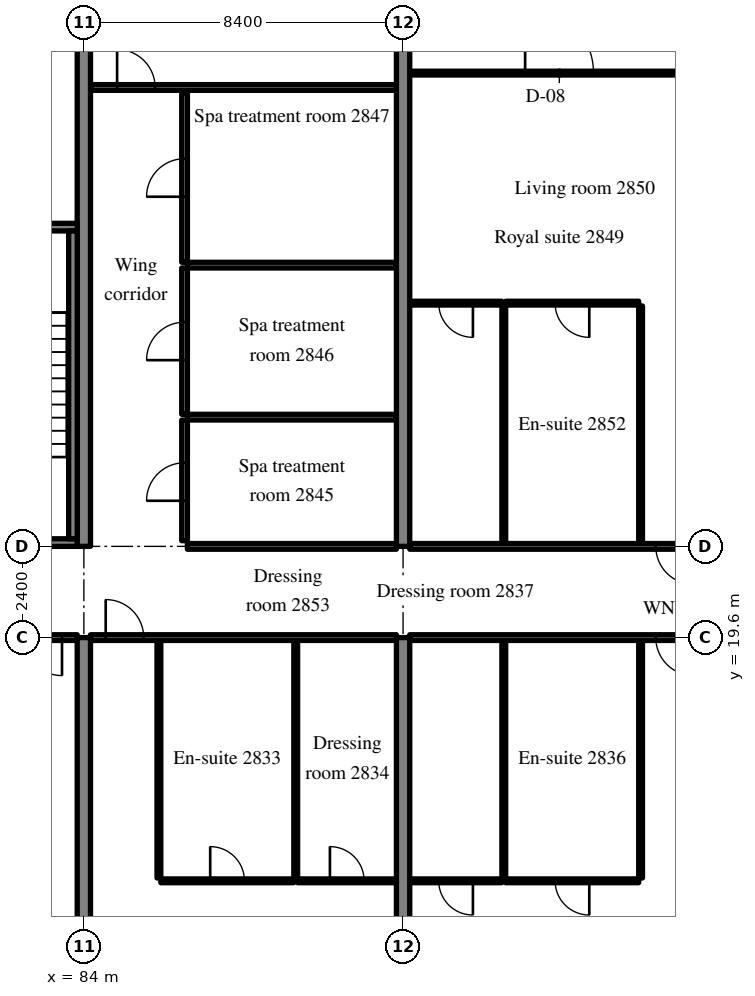
"""IFC4 building model, lengths in metres.
Left out: names, types, materials, properties, quantities, classifications, styles, units other than length and angle.
Written with IfcOpenShell. Run it as: python <this file> out.ifc"""

import sys

from ifc_helpers import new_model, si_unit, direction, frame, frame_2d, origin, place, context, subcontext, project, spatial, rectangle, extrude, source, transform, mapped, element, fill, save


model = new_model("IFC4")
c1 = context("Model", 3, precision=1e-05, world=origin(), true_north=direction((0.0, 1.0)))
c2 = subcontext(c1, "Body", "Model", "MODEL_VIEW")
j1 = project(units=[si_unit("LENGTHUNIT", "METRE"), si_unit("PLANEANGLEUNIT", "RADIAN")], contexts=[c1])
p1 = place(None, origin())
s1 = spatial("IfcSite", under=j1, at=p1, CompositionType="ELEMENT")
p2 = place(p1, origin())
s2 = spatial("IfcBuilding", under=s1, at=p2, CompositionType="ELEMENT")
p3 = place(p2, frame((0.0, 0.0, 118.0)))
s3 = spatial("IfcBuildingStorey", under=s2, at=p3, CompositionType="ELEMENT", Elevation=118.0)
m1 = source(origin(), c2, "Body", "SweptSolid", [
    extrude(rectangle(XDim=14.1, YDim=0.35, at=frame_2d((7.05, 0.0))), origin(), (0.0, 0.0, 1.0), 3.52),
])
p4 = place(p3, frame((84.0, 5.5, 0.0), z_axis=(0.0, 0.0, 1.0), x_axis=(0.0, 1.0, 0.0)))
e1 = element("IfcWall", 1, at=p4, inside=s3, PredefinedType="SHEAR", context=c2, shape_type="MappedRepresentation", body=[
    mapped(m1, transform((0.0, 0.0, 0.0), scale=1.0)),
])
m2 = source(origin(), c2, "Body", "SweptSolid", [
    extrude(rectangle(XDim=20.0, YDim=0.35, at=frame_2d((10.0, 0.0))), origin(), (0.0, 0.0, 1.0), 3.52),
])
p5 = place(p3, frame((84.0, 22.0, 0.0), z_axis=(0.0, 0.0, 1.0), x_axis=(0.0, 1.0, 0.0)))
e2 = element("IfcWall", 2, at=p5, inside=s3, PredefinedType="SHEAR", context=c2, shape_type="MappedRepresentation", body=[
    mapped(m2, transform((0.0, 0.0, 0.0), scale=1.0)),
])
p6 = place(p3, frame((92.4, 5.5, 0.0), z_axis=(0.0, 0.0, 1.0), x_axis=(0.0, 1.0, 0.0)))
e3 = element("IfcWall", 3, at=p6, inside=s3, PredefinedType="SHEAR", context=c2, shape_type="MappedRepresentation", body=[
    mapped(m1, transform((0.0, 0.0, 0.0), scale=1.0)),
])
p7 = place(p3, frame((92.4, 22.0, 0.0), z_axis=(0.0, 0.0, 1.0), x_axis=(0.0, 1.0, 0.0)))
e4 = element("IfcWall", 4, at=p7, inside=s3, PredefinedType="SHEAR", context=c2, shape_type="MappedRepresentation", body=[
    mapped(m2, transform((0.0, 0.0, 0.0), scale=1.0)),
])
m3 = source(origin(), c2, "Body", "SweptSolid", [
    extrude(rectangle(XDim=8.225, YDim=0.2, at=frame_2d((4.112, 0.0))), origin(), (0.0, 0.0, 1.0), 3.52),
])
p8 = place(p3, frame((83.825, 22.1, 0.0), z_axis=(0.0, 0.0, 1.0), x_axis=(-1.0, 0.0, 0.0)))
e5 = element("IfcWall", 5, at=p8, inside=s3, PredefinedType="SOLIDWALL", context=c2, shape_type="MappedRepresentation", body=[
    mapped(m3, transform((0.0, 0.0, 0.0), scale=1.0)),
])
m4 = source(origin(), c2, "Body", "SweptSolid", [
    extrude(rectangle(XDim=1.2, YDim=2.1, at=frame_2d((0.6, 1.05))), frame((0.0, 0.11, 0.0), z_axis=(0.0, -1.0, 0.0), x_axis=(1.0, 0.0, 0.0)), (0.0, 0.0, 1.0), 0.22),
])
p9 = place(p8, frame((6.025, 0.0, 0.0)))
e6 = element("IfcOpeningElement", 6, at=p9, cuts=e5, PredefinedType="OPENING", context=c2, shape_type="MappedRepresentation", body=[
    mapped(m4, transform((0.0, 0.0, 0.0), scale=1.0)),
])
p10 = place(p3, frame((83.825, 30.4, 0.0), z_axis=(0.0, 0.0, 1.0), x_axis=(-1.0, 0.0, 0.0)))
e7 = element("IfcWall", 7, at=p10, inside=s3, PredefinedType="SOLIDWALL", context=c2, shape_type="MappedRepresentation", body=[
    mapped(m3, transform((0.0, 0.0, 0.0), scale=1.0)),
])
m5 = source(origin(), c2, "Body", "SweptSolid", [
    extrude(rectangle(XDim=1.0, YDim=2.1, at=frame_2d((0.5, 1.05))), frame((0.0, 0.11, 0.0), z_axis=(0.0, -1.0, 0.0), x_axis=(1.0, 0.0, 0.0)), (0.0, 0.0, 1.0), 0.22),
])
p11 = place(p10, frame((6.125, 0.0, 0.0)))
e8 = element("IfcOpeningElement", 8, at=p11, cuts=e7, PredefinedType="OPENING", context=c2, shape_type="MappedRepresentation", body=[
    mapped(m5, transform((0.0, 0.0, 0.0), scale=1.0)),
])
m6 = source(origin(), c2, "Body", "SweptSolid", [
    extrude(rectangle(XDim=8.1, YDim=0.225, at=frame_2d((4.05, 0.0))), origin(), (0.0, 0.0, 1.0), 3.52),
])
p12 = place(p3, frame((83.713, 22.2, 0.0), z_axis=(0.0, 0.0, 1.0), x_axis=(0.0, 1.0, 0.0)))
e9 = element("IfcWall", 9, at=p12, inside=s3, PredefinedType="SOLIDWALL", context=c2, shape_type="MappedRepresentation", body=[
    mapped(m6, transform((0.0, 0.0, 0.0), scale=1.0)),
])
m7 = source(origin(), c2, "Body", "SweptSolid", [
    extrude(rectangle(XDim=8.05, YDim=0.15, at=frame_2d((4.025, 0.0))), origin(), (0.0, 0.0, 1.0), 2.82),
])
p13 = place(p3, frame((75.775, 19.6, 0.0), z_axis=(0.0, 0.0, 1.0), x_axis=(1.0, 0.0, 0.0)))
e10 = element("IfcWall", 10, at=p13, inside=s3, PredefinedType="PARTITIONING", context=c2, shape_type="MappedRepresentation", body=[
    mapped(m7, transform((0.0, 0.0, 0.0), scale=1.0)),
])
m8 = source(origin(), c2, "Body", "SweptSolid", [
    extrude(rectangle(XDim=1.0, YDim=2.1, at=frame_2d((0.5, 1.05))), frame((0.0, 0.085, 0.0), z_axis=(0.0, -1.0, 0.0), x_axis=(1.0, 0.0, 0.0)), (0.0, 0.0, 1.0), 0.17),
])
p14 = place(p13, frame((6.65, 0.0, 0.0)))
e11 = element("IfcOpeningElement", 11, at=p14, cuts=e10, PredefinedType="OPENING", context=c2, shape_type="MappedRepresentation", body=[
    mapped(m8, transform((0.0, 0.0, 0.0), scale=1.0)),
])
m9 = source(origin(), c2, "Body", "SweptSolid", [
    extrude(rectangle(XDim=6.25, YDim=0.1, at=frame_2d((3.125, 0.0))), origin(), (0.0, 0.0, 1.0), 3.52),
])
for number, where, z_axis, x_axis in (
    (12, (85.975, 13.275, 0.0), (0.0, 0.0, 1.0), (0.0, 1.0, 0.0)),
    (13, (89.575, 13.275, 0.0), (0.0, 0.0, 1.0), (0.0, 1.0, 0.0)),
):
    element("IfcWall", number, at=place(p3, frame(where, z_axis=z_axis, x_axis=x_axis)), inside=s3, PredefinedType="PARTITIONING", context=c2, shape_type="MappedRepresentation", body=[
        mapped(m9, transform((0.0, 0.0, 0.0), scale=1.0)),
    ])
m10 = source(origin(), c2, "Body", "SweptSolid", [
    extrude(rectangle(XDim=3.5, YDim=0.1, at=frame_2d((1.75, 0.0))), origin(), (0.0, 0.0, 1.0), 3.52),
])
p15 = place(p3, frame((86.025, 13.2, 0.0), z_axis=(0.0, 0.0, 1.0), x_axis=(1.0, 0.0, 0.0)))
e14 = element("IfcWall", 14, at=p15, inside=s3, PredefinedType="PARTITIONING", context=c2, shape_type="MappedRepresentation", body=[
    mapped(m10, transform((0.0, 0.0, 0.0), scale=1.0)),
])
m11 = source(origin(), c2, "Body", "SweptSolid", [
    extrude(rectangle(XDim=0.9, YDim=2.1, at=frame_2d((0.45, 1.05))), frame((0.0, 0.06, 0.0), z_axis=(0.0, -1.0, 0.0), x_axis=(1.0, 0.0, 0.0)), (0.0, 0.0, 1.0), 0.12),
])
p16 = place(p15, frame((1.3, 0.0, 0.0)))
e15 = element("IfcOpeningElement", 15, at=p16, cuts=e14, PredefinedType="OPENING", context=c2, shape_type="MappedRepresentation", body=[
    mapped(m11, transform((0.0, 0.0, 0.0), scale=1.0)),
])
m12 = source(origin(), c2, "Body", "SweptSolid", [
    extrude(rectangle(XDim=2.6, YDim=0.1, at=frame_2d((1.3, 0.0))), origin(), (0.0, 0.0, 1.0), 3.52),
])
p17 = place(p3, frame((89.625, 13.2, 0.0), z_axis=(0.0, 0.0, 1.0), x_axis=(1.0, 0.0, 0.0)))
e16 = element("IfcWall", 16, at=p17, inside=s3, PredefinedType="PARTITIONING", context=c2, shape_type="MappedRepresentation", body=[
    mapped(m12, transform((0.0, 0.0, 0.0), scale=1.0)),
])
p18 = place(p17, frame((0.85, 0.0, 0.0)))
e17 = element("IfcOpeningElement", 17, at=p18, cuts=e16, PredefinedType="OPENING", context=c2, shape_type="MappedRepresentation", body=[
    mapped(m11, transform((0.0, 0.0, 0.0), scale=1.0)),
])
p19 = place(p3, frame((84.175, 19.6, 0.0), z_axis=(0.0, 0.0, 1.0), x_axis=(1.0, 0.0, 0.0)))
e18 = element("IfcWall", 18, at=p19, inside=s3, PredefinedType="PARTITIONING", context=c2, shape_type="MappedRepresentation", body=[
    mapped(m7, transform((0.0, 0.0, 0.0), scale=1.0)),
])
p20 = place(p19, frame((0.4, 0.0, 0.0)))
e19 = element("IfcOpeningElement", 19, at=p20, cuts=e18, PredefinedType="OPENING", context=c2, shape_type="MappedRepresentation", body=[
    mapped(m8, transform((0.0, 0.0, 0.0), scale=1.0)),
])
for number, where, z_axis, x_axis in (
    (20, (98.65, 13.275, 0.0), (0.0, 0.0, 1.0), (0.0, 1.0, 0.0)),
    (21, (95.05, 13.275, 0.0), (0.0, 0.0, 1.0), (0.0, 1.0, 0.0)),
):
    element("IfcWall", number, at=place(p3, frame(where, z_axis=z_axis, x_axis=x_axis)), inside=s3, PredefinedType="PARTITIONING", context=c2, shape_type="MappedRepresentation", body=[
        mapped(m9, transform((0.0, 0.0, 0.0), scale=1.0)),
    ])
p21 = place(p3, frame((95.1, 13.2, 0.0), z_axis=(0.0, 0.0, 1.0), x_axis=(1.0, 0.0, 0.0)))
e22 = element("IfcWall", 22, at=p21, inside=s3, PredefinedType="PARTITIONING", context=c2, shape_type="MappedRepresentation", body=[
    mapped(m10, transform((0.0, 0.0, 0.0), scale=1.0)),
])
p22 = place(p21, frame((1.3, 0.0, 0.0)))
e23 = element("IfcOpeningElement", 23, at=p22, cuts=e22, PredefinedType="OPENING", context=c2, shape_type="MappedRepresentation", body=[
    mapped(m11, transform((0.0, 0.0, 0.0), scale=1.0)),
])
m13 = source(origin(), c2, "Body", "SweptSolid", [
    extrude(rectangle(XDim=2.425, YDim=0.1, at=frame_2d((1.212, 0.0))), origin(), (0.0, 0.0, 1.0), 3.52),
])
p23 = place(p3, frame((92.575, 13.2, 0.0), z_axis=(0.0, 0.0, 1.0), x_axis=(1.0, 0.0, 0.0)))
e24 = element("IfcWall", 24, at=p23, inside=s3, PredefinedType="PARTITIONING", context=c2, shape_type="MappedRepresentation", body=[
    mapped(m13, transform((0.0, 0.0, 0.0), scale=1.0)),
])
p24 = place(p23, frame((0.763, 0.0, 0.0)))
e25 = element("IfcOpeningElement", 25, at=p24, cuts=e24, PredefinedType="OPENING", context=c2, shape_type="MappedRepresentation", body=[
    mapped(m11, transform((0.0, 0.0, 0.0), scale=1.0)),
])
m14 = source(origin(), c2, "Body", "SweptSolid", [
    extrude(rectangle(XDim=7.875, YDim=0.15, at=frame_2d((3.938, 0.0))), origin(), (0.0, 0.0, 1.0), 2.82),
])
p25 = place(p3, frame((92.575, 19.6, 0.0), z_axis=(0.0, 0.0, 1.0), x_axis=(1.0, 0.0, 0.0)))
e26 = element("IfcWall", 26, at=p25, inside=s3, PredefinedType="PARTITIONING", context=c2, shape_type="MappedRepresentation", body=[
    mapped(m14, transform((0.0, 0.0, 0.0), scale=1.0)),
])
p26 = place(p25, frame((6.475, 0.0, 0.0)))
e27 = element("IfcOpeningElement", 27, at=p26, cuts=e26, PredefinedType="OPENING", context=c2, shape_type="MappedRepresentation", body=[
    mapped(m8, transform((0.0, 0.0, 0.0), scale=1.0)),
])
m15 = source(origin(), c2, "Body", "SweptSolid", [
    extrude(rectangle(XDim=5.5, YDim=0.15, at=frame_2d((2.75, 0.0))), origin(), (0.0, 0.0, 1.0), 2.82),
])
p27 = place(p3, frame((86.725, 22.0, 0.0), z_axis=(0.0, 0.0, 1.0), x_axis=(1.0, 0.0, 0.0)))
e28 = element("IfcWall", 28, at=p27, inside=s3, PredefinedType="PARTITIONING", context=c2, shape_type="MappedRepresentation", body=[
    mapped(m15, transform((0.0, 0.0, 0.0), scale=1.0)),
])
m16 = source(origin(), c2, "Body", "SweptSolid", [
    extrude(rectangle(XDim=3.175, YDim=0.15, at=frame_2d((1.587, 0.0))), origin(), (0.0, 0.0, 1.0), 3.52),
])
p28 = place(p3, frame((86.65, 22.15, 0.0), z_axis=(0.0, 0.0, 1.0), x_axis=(0.0, 1.0, 0.0)))
e29 = element("IfcWall", 29, at=p28, inside=s3, PredefinedType="PARTITIONING", context=c2, shape_type="MappedRepresentation", body=[
    mapped(m16, transform((0.0, 0.0, 0.0), scale=1.0)),
])
p29 = place(p28, frame((1.05, 0.0, 0.0)))
e30 = element("IfcOpeningElement", 30, at=p29, cuts=e29, PredefinedType="OPENING", context=c2, shape_type="MappedRepresentation", body=[
    mapped(m8, transform((0.0, 0.0, 0.0), scale=1.0)),
])
m17 = source(origin(), c2, "Body", "SweptSolid", [
    extrude(rectangle(XDim=5.5, YDim=0.15, at=frame_2d((2.75, 0.0))), origin(), (0.0, 0.0, 1.0), 3.52),
])
p30 = place(p3, frame((86.725, 25.4, 0.0), z_axis=(0.0, 0.0, 1.0), x_axis=(1.0, 0.0, 0.0)))
e31 = element("IfcWall", 31, at=p30, inside=s3, PredefinedType="PARTITIONING", context=c2, shape_type="MappedRepresentation", body=[
    mapped(m17, transform((0.0, 0.0, 0.0), scale=1.0)),
])
m18 = source(origin(), c2, "Body", "SweptSolid", [
    extrude(rectangle(XDim=3.85, YDim=0.15, at=frame_2d((1.925, 0.0))), origin(), (0.0, 0.0, 1.0), 3.52),
])
p31 = place(p3, frame((86.65, 25.475, 0.0), z_axis=(0.0, 0.0, 1.0), x_axis=(0.0, 1.0, 0.0)))
e32 = element("IfcWall", 32, at=p31, inside=s3, PredefinedType="PARTITIONING", context=c2, shape_type="MappedRepresentation", body=[
    mapped(m18, transform((0.0, 0.0, 0.0), scale=1.0)),
])
p32 = place(p31, frame((1.425, 0.0, 0.0)))
e33 = element("IfcOpeningElement", 33, at=p32, cuts=e32, PredefinedType="OPENING", context=c2, shape_type="MappedRepresentation", body=[
    mapped(m8, transform((0.0, 0.0, 0.0), scale=1.0)),
])
p33 = place(p3, frame((86.725, 29.4, 0.0), z_axis=(0.0, 0.0, 1.0), x_axis=(1.0, 0.0, 0.0)))
e34 = element("IfcWall", 34, at=p33, inside=s3, PredefinedType="PARTITIONING", context=c2, shape_type="MappedRepresentation", body=[
    mapped(m17, transform((0.0, 0.0, 0.0), scale=1.0)),
])
m19 = source(origin(), c2, "Body", "SweptSolid", [
    extrude(rectangle(XDim=4.45, YDim=0.15, at=frame_2d((2.225, 0.0))), origin(), (0.0, 0.0, 1.0), 3.52),
])
p34 = place(p3, frame((86.65, 29.475, 0.0), z_axis=(0.0, 0.0, 1.0), x_axis=(0.0, 1.0, 0.0)))
e35 = element("IfcWall", 35, at=p34, inside=s3, PredefinedType="PARTITIONING", context=c2, shape_type="MappedRepresentation", body=[
    mapped(m19, transform((0.0, 0.0, 0.0), scale=1.0)),
])
p35 = place(p34, frame((1.725, 0.0, 0.0)))
e36 = element("IfcOpeningElement", 36, at=p35, cuts=e35, PredefinedType="OPENING", context=c2, shape_type="MappedRepresentation", body=[
    mapped(m8, transform((0.0, 0.0, 0.0), scale=1.0)),
])
m20 = source(origin(), c2, "Body", "SweptSolid", [
    extrude(rectangle(XDim=8.05, YDim=0.15, at=frame_2d((4.025, 0.0))), origin(), (0.0, 0.0, 1.0), 3.52),
])
p36 = place(p3, frame((84.175, 34.075, 0.0), z_axis=(0.0, 0.0, 1.0), x_axis=(1.0, 0.0, 0.0)))
e37 = element("IfcWall", 37, at=p36, inside=s3, PredefinedType="PARTITIONING", context=c2, shape_type="MappedRepresentation", body=[
    mapped(m20, transform((0.0, 0.0, 0.0), scale=1.0)),
])
p37 = place(p36, frame((0.7, 0.0, 0.0)))
e38 = element("IfcOpeningElement", 38, at=p37, cuts=e37, PredefinedType="OPENING", context=c2, shape_type="MappedRepresentation", body=[
    mapped(m8, transform((0.0, 0.0, 0.0), scale=1.0)),
])
for number, where, z_axis, x_axis in (
    (39, (98.65, 22.075, 0.0), (0.0, 0.0, 1.0), (0.0, 1.0, 0.0)),
    (40, (95.05, 22.075, 0.0), (0.0, 0.0, 1.0), (0.0, 1.0, 0.0)),
):
    element("IfcWall", number, at=place(p3, frame(where, z_axis=z_axis, x_axis=x_axis)), inside=s3, PredefinedType="PARTITIONING", context=c2, shape_type="MappedRepresentation", body=[
        mapped(m9, transform((0.0, 0.0, 0.0), scale=1.0)),
    ])
p38 = place(p3, frame((95.1, 28.4, 0.0), z_axis=(0.0, 0.0, 1.0), x_axis=(1.0, 0.0, 0.0)))
e41 = element("IfcWall", 41, at=p38, inside=s3, PredefinedType="PARTITIONING", context=c2, shape_type="MappedRepresentation", body=[
    mapped(m10, transform((0.0, 0.0, 0.0), scale=1.0)),
])
p39 = place(p38, frame((1.3, 0.0, 0.0)))
e42 = element("IfcOpeningElement", 42, at=p39, cuts=e41, PredefinedType="OPENING", context=c2, shape_type="MappedRepresentation", body=[
    mapped(m11, transform((0.0, 0.0, 0.0), scale=1.0)),
])
p40 = place(p3, frame((92.575, 28.4, 0.0), z_axis=(0.0, 0.0, 1.0), x_axis=(1.0, 0.0, 0.0)))
e43 = element("IfcWall", 43, at=p40, inside=s3, PredefinedType="PARTITIONING", context=c2, shape_type="MappedRepresentation", body=[
    mapped(m13, transform((0.0, 0.0, 0.0), scale=1.0)),
])
p41 = place(p40, frame((0.763, 0.0, 0.0)))
e44 = element("IfcOpeningElement", 44, at=p41, cuts=e43, PredefinedType="OPENING", context=c2, shape_type="MappedRepresentation", body=[
    mapped(m11, transform((0.0, 0.0, 0.0), scale=1.0)),
])
m21 = source(origin(), c2, "Body", "SweptSolid", [
    extrude(rectangle(XDim=7.875, YDim=0.1, at=frame_2d((3.938, 0.0))), origin(), (0.0, 0.0, 1.0), 3.52),
])
p42 = place(p3, frame((92.575, 34.453, 0.0), z_axis=(0.0, 0.0, 1.0), x_axis=(1.0, 0.0, 0.0)))
e45 = element("IfcWall", 45, at=p42, inside=s3, PredefinedType="PARTITIONING", context=c2, shape_type="MappedRepresentation", body=[
    mapped(m21, transform((0.0, 0.0, 0.0), scale=1.0)),
])
m22 = source(origin(), c2, "Body", "SweptSolid", [
    extrude(rectangle(XDim=1.8, YDim=2.1, at=frame_2d((0.9, 1.05))), frame((0.0, 0.06, 0.0), z_axis=(0.0, -1.0, 0.0), x_axis=(1.0, 0.0, 0.0)), (0.0, 0.0, 1.0), 0.12),
])
p43 = place(p42, frame((3.037, 0.0, 0.0)))
e46 = element("IfcOpeningElement", 46, at=p43, cuts=e45, PredefinedType="OPENING", context=c2, shape_type="MappedRepresentation", body=[
    mapped(m22, transform((0.0, 0.0, 0.0), scale=1.0)),
])
p44 = place(p3, frame((92.575, 22.0, 0.0), z_axis=(0.0, 0.0, 1.0), x_axis=(1.0, 0.0, 0.0)))
e47 = element("IfcWall", 47, at=p44, inside=s3, PredefinedType="PARTITIONING", context=c2, shape_type="MappedRepresentation", body=[
    mapped(m14, transform((0.0, 0.0, 0.0), scale=1.0)),
])
p45 = place(p44, frame((6.475, 0.0, 0.0)))
e48 = element("IfcOpeningElement", 48, at=p45, cuts=e47, PredefinedType="OPENING", context=c2, shape_type="MappedRepresentation", body=[
    mapped(m8, transform((0.0, 0.0, 0.0), scale=1.0)),
])
m23 = source(origin(), c2, "Body", "SweptSolid", [
    extrude(rectangle(XDim=1.0, YDim=2.1, at=frame_2d((0.5, 1.05))), frame((0.0, 0.025, 0.0), z_axis=(0.0, -1.0, 0.0), x_axis=(1.0, 0.0, 0.0)), (0.0, 0.0, 1.0), 0.05),
])
p46 = place(p14, origin())
e49 = element("IfcDoor", 49, at=p46, inside=s3, OperationType="SINGLE_SWING_RIGHT", PredefinedType="DOOR", context=c2, shape_type="MappedRepresentation", body=[
    mapped(m23, transform((0.0, 0.0, 0.0), scale=1.0)),
])
fill(e11, e49)
m24 = source(origin(), c2, "Body", "SweptSolid", [
    extrude(rectangle(XDim=0.9, YDim=2.1, at=frame_2d((0.45, 1.05))), frame((0.0, 0.025, 0.0), z_axis=(0.0, -1.0, 0.0), x_axis=(1.0, 0.0, 0.0)), (0.0, 0.0, 1.0), 0.05),
])
p47 = place(p16, origin())
e50 = element("IfcDoor", 50, at=p47, inside=s3, OperationType="SINGLE_SWING_LEFT", PredefinedType="DOOR", context=c2, shape_type="MappedRepresentation", body=[
    mapped(m24, transform((0.0, 0.0, 0.0), scale=1.0)),
])
fill(e15, e50)
p48 = place(p18, origin())
e51 = element("IfcDoor", 51, at=p48, inside=s3, OperationType="SINGLE_SWING_LEFT", PredefinedType="DOOR", context=c2, shape_type="MappedRepresentation", body=[
    mapped(m24, transform((0.0, 0.0, 0.0), scale=1.0)),
])
fill(e17, e51)
p49 = place(p20, origin())
e52 = element("IfcDoor", 52, at=p49, inside=s3, OperationType="SINGLE_SWING_LEFT", PredefinedType="DOOR", context=c2, shape_type="MappedRepresentation", body=[
    mapped(m23, transform((0.0, 0.0, 0.0), scale=1.0)),
])
fill(e19, e52)
p50 = place(p22, origin())
e53 = element("IfcDoor", 53, at=p50, inside=s3, OperationType="SINGLE_SWING_RIGHT", PredefinedType="DOOR", context=c2, shape_type="MappedRepresentation", body=[
    mapped(m24, transform((0.0, 0.0, 0.0), scale=1.0)),
])
fill(e23, e53)
p51 = place(p24, origin())
e54 = element("IfcDoor", 54, at=p51, inside=s3, OperationType="SINGLE_SWING_RIGHT", PredefinedType="DOOR", context=c2, shape_type="MappedRepresentation", body=[
    mapped(m24, transform((0.0, 0.0, 0.0), scale=1.0)),
])
fill(e25, e54)
p52 = place(p26, origin())
e55 = element("IfcDoor", 55, at=p52, inside=s3, OperationType="SINGLE_SWING_RIGHT", PredefinedType="DOOR", context=c2, shape_type="MappedRepresentation", body=[
    mapped(m23, transform((0.0, 0.0, 0.0), scale=1.0)),
])
fill(e27, e55)
p53 = place(p29, origin())
e56 = element("IfcDoor", 56, at=p53, inside=s3, OperationType="SINGLE_SWING_LEFT", PredefinedType="DOOR", context=c2, shape_type="MappedRepresentation", body=[
    mapped(m23, transform((0.0, 0.0, 0.0), scale=1.0)),
])
fill(e30, e56)
p54 = place(p32, origin())
e57 = element("IfcDoor", 57, at=p54, inside=s3, OperationType="SINGLE_SWING_LEFT", PredefinedType="DOOR", context=c2, shape_type="MappedRepresentation", body=[
    mapped(m23, transform((0.0, 0.0, 0.0), scale=1.0)),
])
fill(e33, e57)
p55 = place(p35, origin())
e58 = element("IfcDoor", 58, at=p55, inside=s3, OperationType="SINGLE_SWING_LEFT", PredefinedType="DOOR", context=c2, shape_type="MappedRepresentation", body=[
    mapped(m23, transform((0.0, 0.0, 0.0), scale=1.0)),
])
fill(e36, e58)
p56 = place(p37, origin())
e59 = element("IfcDoor", 59, at=p56, inside=s3, OperationType="SINGLE_SWING_LEFT", PredefinedType="DOOR", context=c2, shape_type="MappedRepresentation", body=[
    mapped(m23, transform((0.0, 0.0, 0.0), scale=1.0)),
])
fill(e38, e59)
p57 = place(p39, origin())
e60 = element("IfcDoor", 60, at=p57, inside=s3, OperationType="SINGLE_SWING_RIGHT", PredefinedType="DOOR", context=c2, shape_type="MappedRepresentation", body=[
    mapped(m24, transform((0.0, 0.0, 0.0), scale=1.0)),
])
fill(e42, e60)
p58 = place(p41, origin())
e61 = element("IfcDoor", 61, at=p58, inside=s3, OperationType="SINGLE_SWING_RIGHT", PredefinedType="DOOR", context=c2, shape_type="MappedRepresentation", body=[
    mapped(m24, transform((0.0, 0.0, 0.0), scale=1.0)),
])
fill(e44, e61)
m25 = source(origin(), c2, "Body", "SweptSolid", [
    extrude(rectangle(XDim=1.8, YDim=2.1, at=frame_2d((0.9, 1.05))), frame((0.0, 0.025, 0.0), z_axis=(0.0, -1.0, 0.0), x_axis=(1.0, 0.0, 0.0)), (0.0, 0.0, 1.0), 0.05),
])
p59 = place(p43, origin())
e62 = element("IfcDoor", 62, at=p59, inside=s3, OperationType="DOUBLE_DOOR_SINGLE_SWING", PredefinedType="DOOR", context=c2, shape_type="MappedRepresentation", body=[
    mapped(m25, transform((0.0, 0.0, 0.0), scale=1.0)),
])
fill(e46, e62)
p60 = place(p45, origin())
e63 = element("IfcDoor", 63, at=p60, inside=s3, OperationType="SINGLE_SWING_RIGHT", PredefinedType="DOOR", context=c2, shape_type="MappedRepresentation", body=[
    mapped(m23, transform((0.0, 0.0, 0.0), scale=1.0)),
])
fill(e48, e63)
save(model, sys.argv[1])
